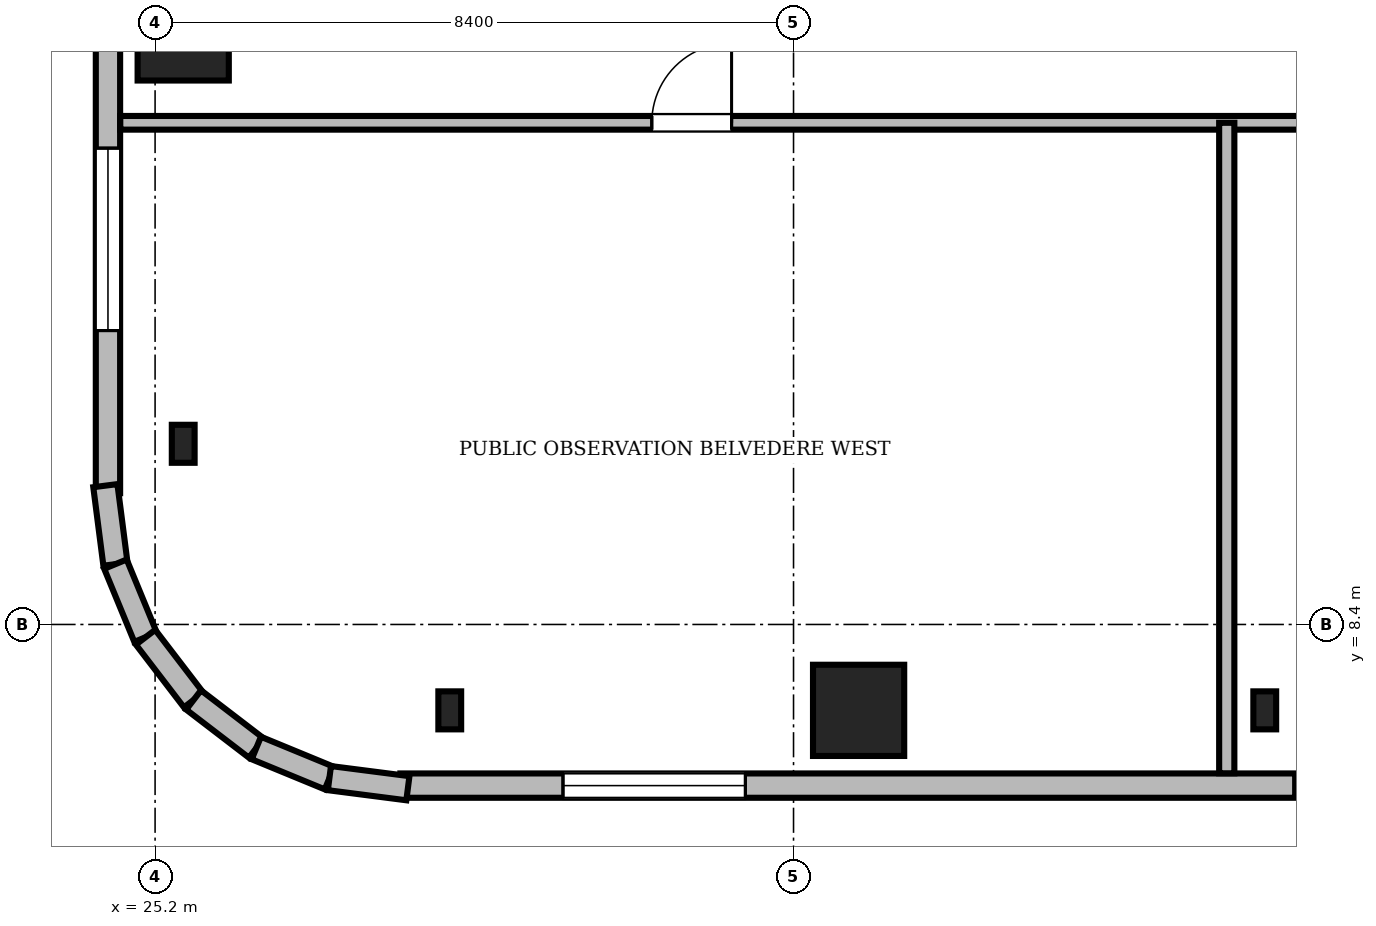
"""IFC4 building model, lengths in metres.
Left out: names, types, materials, properties, quantities, classifications, styles, units other than length and angle.
Written with IfcOpenShell. Run it as: python <this file> out.ifc"""

import sys

from ifc_helpers import new_model, si_unit, direction, frame, frame_2d, origin, origin_2d, place, context, subcontext, project, spatial, rectangle, i_section, extrude, source, transform, mapped, element, fill, save


model = new_model("IFC4")
c1 = context("Model", 3, precision=1e-05, world=origin(), true_north=direction((0.0, 1.0)))
c2 = subcontext(c1, "Body", "Model", "MODEL_VIEW")
j1 = project(units=[si_unit("LENGTHUNIT", "METRE"), si_unit("PLANEANGLEUNIT", "RADIAN")], contexts=[c1])
p1 = place(None, origin())
s1 = spatial("IfcSite", under=j1, at=p1, CompositionType="ELEMENT")
p2 = place(p1, origin())
s2 = spatial("IfcBuilding", under=s1, at=p2, CompositionType="ELEMENT")
p3 = place(p2, frame((0.0, 0.0, 286.15)))
s3 = spatial("IfcBuildingStorey", under=s2, at=p3, CompositionType="ELEMENT", Elevation=286.15)
m1 = source(origin(), c2, "Body", "SweptSolid", [
    extrude(rectangle(XDim=1.2, YDim=1.2, at=origin_2d()), origin(), (0.0, 0.0, 1.0), 4.738),
])
for number, where, z_axis, x_axis in (
    (1, (34.456, 7.27, 0.0), (0.054, 0.114, 0.992), (-0.904, 0.428, 0.0)),
    (2, (25.57, 16.156, 0.0), (0.114, 0.054, 0.992), (-0.428, 0.904, 0.0)),
):
    element("IfcColumn", number, at=place(p3, frame(where, z_axis=z_axis, x_axis=x_axis)), inside=s3, PredefinedType="COLUMN", context=c2, shape_type="MappedRepresentation", body=[
        mapped(m1, transform((0.0, 0.0, 0.0), scale=1.0)),
    ])
m2 = source(origin(), c2, "Body", "SweptSolid", [
    extrude(i_section(OverallWidth=0.3, OverallDepth=0.5, WebThickness=0.014, FlangeThickness=0.028, FilletRadius=0.027, at=origin_2d()), origin(), (0.0, 0.0, 1.0), 4.75),
])
p4 = place(p3, frame((29.077, 7.27, 0.0), z_axis=(0.089684635479, 0.113686196951, 0.98946051704), x_axis=(-0.785109845133, 0.619356546002, 0.0)))
e3 = element("IfcColumn", 3, at=p4, inside=s3, PredefinedType="COLUMN", context=c2, shape_type="MappedRepresentation", body=[
    mapped(m2, transform((0.0, 0.0, 0.0), scale=1.0)),
])
m3 = source(origin(), c2, "Body", "SweptSolid", [
    extrude(i_section(OverallWidth=0.3, OverallDepth=0.5, WebThickness=0.014, FlangeThickness=0.028, FilletRadius=0.027, at=origin_2d()), origin(), (0.0, 0.0, 1.0), 4.731),
])
p5 = place(p3, frame((39.8, 7.27, 0.0), z_axis=(0.0, 0.114146181694, 0.993463964724), x_axis=(-1.0, 0.0, 0.0)))
e4 = element("IfcColumn", 4, at=p5, inside=s3, PredefinedType="COLUMN", context=c2, shape_type="MappedRepresentation", body=[
    mapped(m3, transform((0.0, 0.0, 0.0), scale=1.0)),
])
p6 = place(p3, frame((25.57, 10.777, 0.0), z_axis=(0.113686720825, 0.089633653308, 0.989465076545), x_axis=(-0.619137694589, 0.785282442908, 0.0)))
e5 = element("IfcColumn", 5, at=p6, inside=s3, PredefinedType="COLUMN", context=c2, shape_type="MappedRepresentation", body=[
    mapped(m2, transform((0.0, 0.0, 0.0), scale=1.0)),
])
m4 = source(origin(), c2, "Body", "SweptSolid", [
    extrude(rectangle(XDim=11.773, YDim=0.32, at=frame_2d((5.886, 0.0))), origin(), (0.0, 0.0, 1.0), 4.7),
])
p7 = place(p3, frame((28.427, 6.28, 0.0), z_axis=(0.0, 0.0, 1.0), x_axis=(1.0, 0.0, 0.0)))
e6 = element("IfcWall", 6, at=p7, inside=s3, PredefinedType="SOLIDWALL", context=c2, shape_type="MappedRepresentation", body=[
    mapped(m4, transform((0.0, 0.0, 0.0), scale=1.0)),
])
m5 = source(origin(), c2, "Body", "SweptSolid", [
    extrude(rectangle(XDim=2.4, YDim=3.2, at=frame_2d((1.2, 1.6))), frame((0.0, 0.17, 0.0), z_axis=(0.0, -1.0, 0.0), x_axis=(1.0, 0.0, 0.0)), (0.0, 0.0, 1.0), 0.34),
])
p8 = place(p7, frame((2.14, 0.0, 0.72)))
e7 = element("IfcOpeningElement", 7, at=p8, cuts=e6, PredefinedType="OPENING", context=c2, shape_type="MappedRepresentation", body=[
    mapped(m5, transform((0.0, 0.0, 0.0), scale=1.0)),
])
p9 = place(p3, frame((24.58, 21.9, 0.0), z_axis=(0.0, 0.0, 1.0), x_axis=(0.0, -1.0, 0.0)))
e8 = element("IfcWall", 8, at=p9, inside=s3, PredefinedType="SOLIDWALL", context=c2, shape_type="MappedRepresentation", body=[
    mapped(m4, transform((0.0, 0.0, 0.0), scale=1.0)),
])
m6 = source(origin(), c2, "Body", "SweptSolid", [
    extrude(rectangle(XDim=1.4, YDim=2.3, at=frame_2d((0.7, 1.15))), frame((0.0, 0.17, 0.0), z_axis=(0.0, -1.0, 0.0), x_axis=(1.0, 0.0, 0.0)), (0.0, 0.0, 1.0), 0.34),
])
p10 = place(p9, frame((3.12, 0.0, 0.0)))
e9 = element("IfcOpeningElement", 9, at=p10, cuts=e8, PredefinedType="OPENING", context=c2, shape_type="MappedRepresentation", body=[
    mapped(m6, transform((0.0, 0.0, 0.0), scale=1.0)),
])
p11 = place(p9, frame((7.233, 0.0, 0.72)))
e10 = element("IfcOpeningElement", 10, at=p11, cuts=e8, PredefinedType="OPENING", context=c2, shape_type="MappedRepresentation", body=[
    mapped(m5, transform((0.0, 0.0, 0.0), scale=1.0)),
])
m7 = source(origin(), c2, "Body", "SweptSolid", [
    extrude(rectangle(XDim=1.041, YDim=0.32, at=frame_2d((0.521, 0.0))), origin(), (0.0, 0.0, 1.0), 4.7),
])
p12 = place(p3, frame((24.546, 10.226, 0.0), z_axis=(0.0, 0.0, 1.0), x_axis=(0.127584365255, -0.991827721806, 0.0)))
e11 = element("IfcWall", 11, at=p12, inside=s3, PredefinedType="SOLIDWALL", context=c2, shape_type="MappedRepresentation", body=[
    mapped(m7, transform((0.0, 0.0, 0.0), scale=1.0)),
])
m8 = source(origin(), c2, "Body", "SweptSolid", [
    extrude(rectangle(XDim=1.04, YDim=0.32, at=frame_2d((0.52, 0.0))), origin(), (0.0, 0.0, 1.0), 4.7),
])
p13 = place(p3, frame((24.678, 9.194, 0.0), z_axis=(0.0, 0.0, 1.0), x_axis=(0.380761612086, -0.92467323675, 0.0)))
e12 = element("IfcWall", 12, at=p13, inside=s3, PredefinedType="SOLIDWALL", context=c2, shape_type="MappedRepresentation", body=[
    mapped(m8, transform((0.0, 0.0, 0.0), scale=1.0)),
])
m9 = source(origin(), c2, "Body", "SweptSolid", [
    extrude(rectangle(XDim=1.04, YDim=0.32, at=frame_2d((0.52, 0.0))), origin(), (0.0, 0.0, 1.0), 4.7),
])
for number, where, z_axis, x_axis in (
    (13, (25.074, 8.232, 0.0), (0.0, 0.0, 1.0), (0.608, -0.794, 0.0)),
    (14, (25.707, 7.407, 0.0), (0.0, 0.0, 1.0), (0.794, -0.608, 0.0)),
):
    element("IfcWall", number, at=place(p3, frame(where, z_axis=z_axis, x_axis=x_axis)), inside=s3, PredefinedType="SOLIDWALL", context=c2, shape_type="MappedRepresentation", body=[
        mapped(m9, transform((0.0, 0.0, 0.0), scale=1.0)),
    ])
p14 = place(p3, frame((26.532, 6.774, 0.0), z_axis=(0.0, 0.0, 1.0), x_axis=(0.92467323675, -0.380761612086, 0.0)))
e15 = element("IfcWall", 15, at=p14, inside=s3, PredefinedType="SOLIDWALL", context=c2, shape_type="MappedRepresentation", body=[
    mapped(m8, transform((0.0, 0.0, 0.0), scale=1.0)),
])
p15 = place(p3, frame((27.494, 6.378, 0.0), z_axis=(0.0, 0.0, 1.0), x_axis=(0.991827721806, -0.127584365255, 0.0)))
e16 = element("IfcWall", 16, at=p15, inside=s3, PredefinedType="SOLIDWALL", context=c2, shape_type="MappedRepresentation", body=[
    mapped(m7, transform((0.0, 0.0, 0.0), scale=1.0)),
])
m10 = source(origin(), c2, "Body", "SweptSolid", [
    extrude(rectangle(XDim=25.558, YDim=0.18, at=frame_2d((12.779, 0.0))), origin(), (0.0, 0.0, 1.0), 3.942),
])
p16 = place(p3, frame((24.742, 15.0, 0.0), z_axis=(0.0, 0.0, 1.0), x_axis=(1.0, 0.0, 0.0)))
e17 = element("IfcWall", 17, at=p16, inside=s3, PredefinedType="PARTITIONING", context=c2, shape_type="MappedRepresentation", body=[
    mapped(m10, transform((0.0, 0.0, 0.0), scale=1.0)),
])
m11 = source(origin(), c2, "Body", "SweptSolid", [
    extrude(rectangle(XDim=1.05, YDim=2.2, at=frame_2d((0.525, 1.1))), frame((0.0, 0.1, 0.0), z_axis=(0.0, -1.0, 0.0), x_axis=(1.0, 0.0, 0.0)), (0.0, 0.0, 1.0), 0.2),
])
p17 = place(p16, frame((6.993, 0.0, 0.0)))
e18 = element("IfcOpeningElement", 18, at=p17, cuts=e17, PredefinedType="OPENING", context=c2, shape_type="MappedRepresentation", body=[
    mapped(m11, transform((0.0, 0.0, 0.0), scale=1.0)),
])
p18 = place(p16, frame((18.238, 0.0, 0.0)))
e19 = element("IfcOpeningElement", 19, at=p18, cuts=e17, PredefinedType="OPENING", context=c2, shape_type="MappedRepresentation", body=[
    mapped(m11, transform((0.0, 0.0, 0.0), scale=1.0)),
])
p19 = place(p16, frame((24.308, 0.0, 0.0)))
e20 = element("IfcOpeningElement", 20, at=p19, cuts=e17, PredefinedType="OPENING", context=c2, shape_type="MappedRepresentation", body=[
    mapped(m11, transform((0.0, 0.0, 0.0), scale=1.0)),
])
m12 = source(origin(), c2, "Body", "SweptSolid", [
    extrude(rectangle(XDim=8.558, YDim=0.2, at=frame_2d((4.279, 0.0))), origin(), (0.0, 0.0, 1.0), 3.942),
])
p20 = place(p3, frame((39.3, 6.442, 0.0), z_axis=(0.0, 0.0, 1.0), x_axis=(0.0, 1.0, 0.0)))
e21 = element("IfcWall", 21, at=p20, inside=s3, PredefinedType="PARTITIONING", context=c2, shape_type="MappedRepresentation", body=[
    mapped(m12, transform((0.0, 0.0, 0.0), scale=1.0)),
])
m13 = source(origin(), c2, "Body", "SweptSolid", [
    extrude(rectangle(XDim=2.4, YDim=3.2, at=frame_2d((1.2, 1.6))), frame((0.0, 0.03, 0.0), z_axis=(0.0, -1.0, 0.0), x_axis=(1.0, 0.0, 0.0)), (0.0, 0.0, 1.0), 0.06),
])
p21 = place(p8, origin())
e22 = element("IfcWindow", 22, at=p21, inside=s3, PartitioningType="SINGLE_PANEL", PredefinedType="WINDOW", context=c2, shape_type="MappedRepresentation", body=[
    mapped(m13, transform((0.0, 0.0, 0.0), scale=1.0)),
])
fill(e7, e22)
p22 = place(p11, origin())
e23 = element("IfcWindow", 23, at=p22, inside=s3, PartitioningType="SINGLE_PANEL", PredefinedType="WINDOW", context=c2, shape_type="MappedRepresentation", body=[
    mapped(m13, transform((0.0, 0.0, 0.0), scale=1.0)),
])
fill(e10, e23)
m14 = source(origin(), c2, "Body", "SweptSolid", [
    extrude(rectangle(XDim=1.05, YDim=2.2, at=frame_2d((0.525, 1.1))), frame((0.0, 0.025, 0.0), z_axis=(0.0, -1.0, 0.0), x_axis=(1.0, 0.0, 0.0)), (0.0, 0.0, 1.0), 0.05),
])
p23 = place(p17, origin())
e24 = element("IfcDoor", 24, at=p23, inside=s3, OperationType="SINGLE_SWING_RIGHT", PredefinedType="DOOR", context=c2, shape_type="MappedRepresentation", body=[
    mapped(m14, transform((0.0, 0.0, 0.0), scale=1.0)),
])
fill(e18, e24)
save(model, sys.argv[1])
